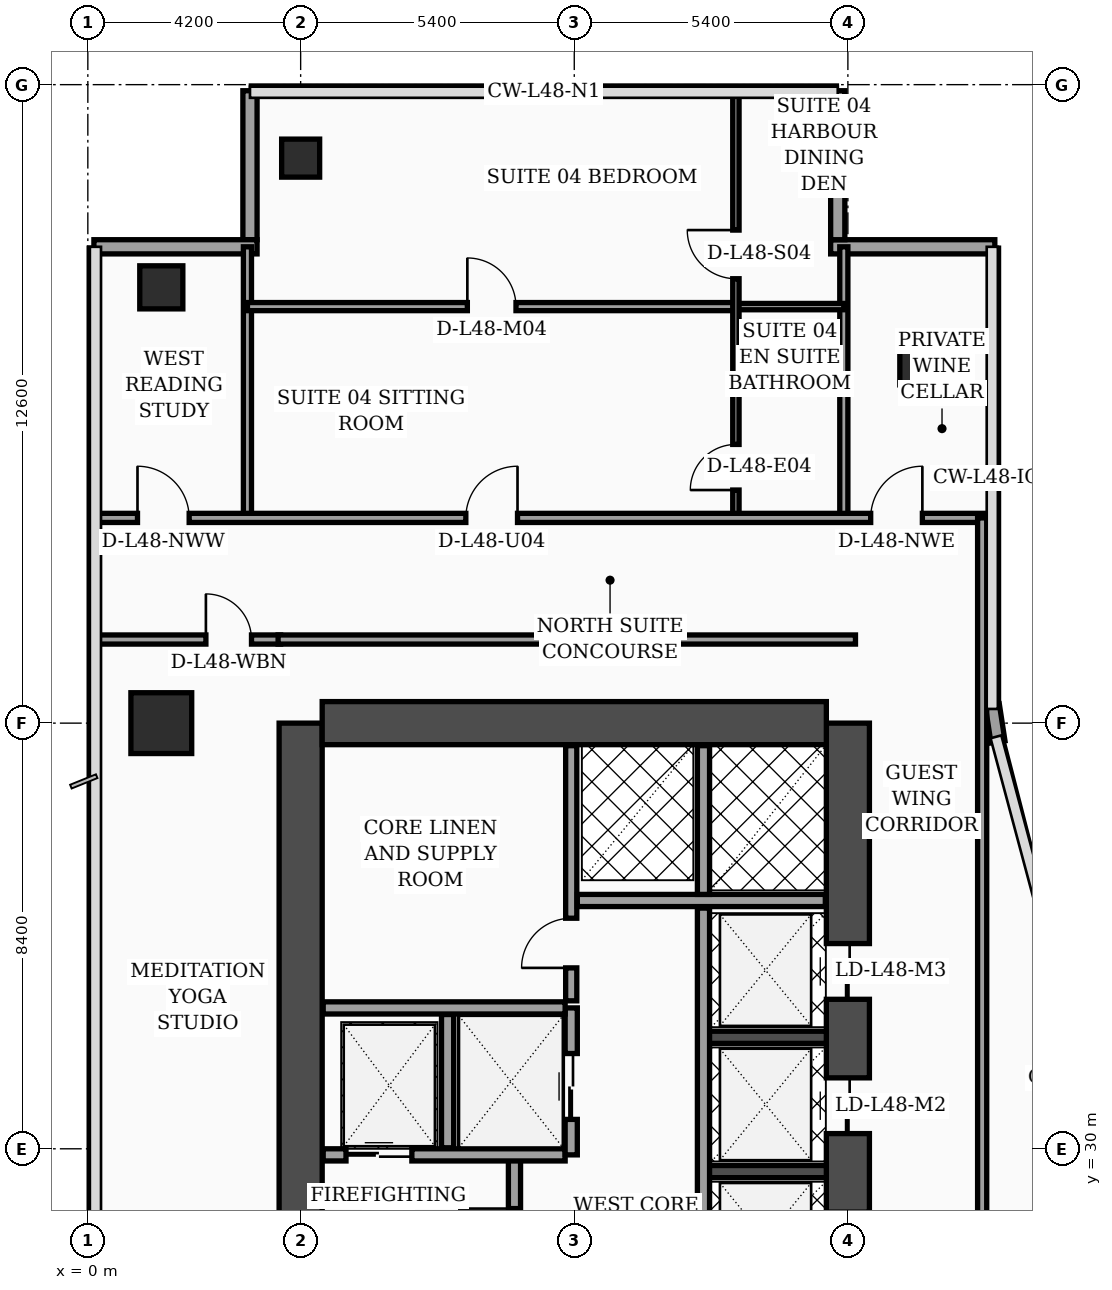
"""IFC4 building model, lengths in metres.
Left out: names, types, materials, properties, quantities, classifications, styles, units other than length and angle.
Written with IfcOpenShell. Run it as: python <this file> out.ifc"""

import sys

from ifc_helpers import new_model, si_unit, direction, frame, frame_2d, origin, origin_2d, place, context, subcontext, project, spatial, rectangle, hollow_rectangle, extrude, element, fill, save


model = new_model("IFC4")
c1 = context("Model", 3, precision=1e-05, world=origin(), true_north=direction((0.0, 1.0)))
c2 = subcontext(c1, "Body", "Model", "MODEL_VIEW")
j1 = project(units=[si_unit("LENGTHUNIT", "METRE"), si_unit("PLANEANGLEUNIT", "RADIAN")], contexts=[c1])
p1 = place(None, origin())
s1 = spatial("IfcSite", under=j1, at=p1, CompositionType="ELEMENT")
p2 = place(p1, origin())
s2 = spatial("IfcBuilding", under=s1, at=p2, CompositionType="ELEMENT")
p3 = place(p2, frame((0.0, 0.0, 195.1)))
s3 = spatial("IfcBuildingStorey", under=s2, at=p3, CompositionType="ELEMENT", Elevation=195.1)
p4 = place(p3, frame((4.2, 16.8, 0.0), z_axis=(0.0, 0.0, 1.0), x_axis=(0.0, 1.0, 0.0)))
e1 = element("IfcWall", 1, at=p4, inside=s3, PredefinedType="SHEAR", context=c2, shape_type="SweptSolid", body=[
    extrude(rectangle(XDim=21.6, YDim=0.85, at=frame_2d((10.8, 0.0))), origin(), (0.0, 0.0, 1.0), 4.05),
])
p5 = place(p3, frame((15.0, 16.8, 0.0), z_axis=(0.0, 0.0, 1.0), x_axis=(0.0, 1.0, 0.0)))
e2 = element("IfcWall", 2, at=p5, inside=s3, PredefinedType="SHEAR", context=c2, shape_type="SweptSolid", body=[
    extrude(rectangle(XDim=21.6, YDim=0.85, at=frame_2d((10.8, 0.0))), origin(), (0.0, 0.0, 1.0), 4.05),
])
p6 = place(p5, frame((8.65, 0.0, 0.0)))
e3 = element("IfcOpeningElement", 3, at=p6, cuts=e2, PredefinedType="OPENING", context=c2, shape_type="SweptSolid", body=[
    extrude(rectangle(XDim=1.1, YDim=2.2, at=frame_2d((0.55, 1.1))), frame((0.0, 0.435, 0.0), z_axis=(0.0, -1.0, 0.0), x_axis=(1.0, 0.0, 0.0)), (0.0, 0.0, 1.0), 0.87),
])
p7 = place(p5, frame((10.85, 0.0, 0.0)))
e4 = element("IfcOpeningElement", 4, at=p7, cuts=e2, PredefinedType="OPENING", context=c2, shape_type="SweptSolid", body=[
    extrude(rectangle(XDim=1.1, YDim=2.2, at=frame_2d((0.55, 1.1))), frame((0.0, 0.435, 0.0), z_axis=(0.0, -1.0, 0.0), x_axis=(1.0, 0.0, 0.0)), (0.0, 0.0, 1.0), 0.87),
])
p8 = place(p5, frame((13.5, 0.0, 0.0)))
e5 = element("IfcOpeningElement", 5, at=p8, cuts=e2, PredefinedType="OPENING", context=c2, shape_type="SweptSolid", body=[
    extrude(rectangle(XDim=1.1, YDim=2.2, at=frame_2d((0.55, 1.1))), frame((0.0, 0.435, 0.0), z_axis=(0.0, -1.0, 0.0), x_axis=(1.0, 0.0, 0.0)), (0.0, 0.0, 1.0), 0.87),
])
p9 = place(p5, frame((16.15, 0.0, 0.0)))
e6 = element("IfcOpeningElement", 6, at=p9, cuts=e2, PredefinedType="OPENING", context=c2, shape_type="SweptSolid", body=[
    extrude(rectangle(XDim=1.1, YDim=2.2, at=frame_2d((0.55, 1.1))), frame((0.0, 0.435, 0.0), z_axis=(0.0, -1.0, 0.0), x_axis=(1.0, 0.0, 0.0)), (0.0, 0.0, 1.0), 0.87),
])
p10 = place(p3, frame((4.625, 38.4, 0.0), z_axis=(0.0, 0.0, 1.0), x_axis=(1.0, 0.0, 0.0)))
e7 = element("IfcWall", 7, at=p10, inside=s3, PredefinedType="SHEAR", context=c2, shape_type="SweptSolid", body=[
    extrude(rectangle(XDim=9.95, YDim=0.85, at=frame_2d((4.975, 0.0))), origin(), (0.0, 0.0, 1.0), 4.05),
])
for number, where, z_axis, x_axis in (
    (8, (12.18, 29.55, 0.0), (0.0, 0.0, 1.0), (1.0, 0.0, 0.0)),
    (9, (12.18, 32.2, 0.0), (0.0, 0.0, 1.0), (1.0, 0.0, 0.0)),
):
    element("IfcWall", number, at=place(p3, frame(where, z_axis=z_axis, x_axis=x_axis)), inside=s3, PredefinedType="SOLIDWALL", context=c2, shape_type="SweptSolid", body=[
        extrude(rectangle(XDim=2.395, YDim=0.24, at=frame_2d((1.198, 0.0))), origin(), (0.0, 0.0, 1.0), 4.05),
    ])
p11 = place(p3, frame((1.45, 38.4, 0.0), z_axis=(0.0, 0.0, 1.0), x_axis=(1.0, 0.0, 0.0)))
e10 = element("IfcColumn", 10, at=p11, inside=s3, PredefinedType="COLUMN", context=c2, shape_type="SweptSolid", body=[
    extrude(rectangle(XDim=1.2, YDim=1.2, at=origin_2d()), origin(), (0.0, 0.0, 1.0), 4.05),
])
p12 = place(p3, frame((1.45, 47.0, 0.0), z_axis=(0.0, 0.0, 1.0), x_axis=(1.0, 0.0, 0.0)))
e11 = element("IfcColumn", 11, at=p12, inside=s3, PredefinedType="COLUMN", context=c2, shape_type="SweptSolid", body=[
    extrude(hollow_rectangle(XDim=0.85, YDim=0.85, WallThickness=0.036, at=origin_2d()), origin(), (0.0, 0.0, 1.0), 4.05),
])
p13 = place(p3, frame((4.2, 49.55, 0.0), z_axis=(0.0, 0.0, 1.0), x_axis=(1.0, 0.0, 0.0)))
e12 = element("IfcColumn", 12, at=p13, inside=s3, PredefinedType="COLUMN", context=c2, shape_type="SweptSolid", body=[
    extrude(hollow_rectangle(XDim=0.75, YDim=0.75, WallThickness=0.032, at=origin_2d()), origin(), (0.0, 0.0, 1.0), 4.05),
])
p14 = place(p3, frame((16.55, 45.6, 0.0), z_axis=(0.0, 0.0, 1.0), x_axis=(1.0, 0.0, 0.0)))
e13 = element("IfcColumn", 13, at=p14, inside=s3, PredefinedType="COLUMN", context=c2, shape_type="SweptSolid", body=[
    extrude(rectangle(XDim=1.05, YDim=1.05, at=origin_2d()), origin(), (0.0, 0.0, 1.0), 4.05),
])
p15 = place(p3, frame((17.962, 38.03, 0.0), z_axis=(0.0, 0.0, 1.0), x_axis=(-0.15141125477, 0.988470855377, 0.0)))
e14 = element("IfcWall", 14, at=p15, inside=s3, PredefinedType="SOLIDWALL", context=c2, shape_type="SweptSolid", body=[
    extrude(rectangle(XDim=0.739, YDim=0.28, at=frame_2d((0.369, 0.0))), origin(), (0.0, 0.0, 1.0), 4.05),
])
p16 = place(p3, frame((17.9, 47.8, 0.0), z_axis=(0.0, 0.0, 1.0), x_axis=(-1.0, 0.0, 0.0)))
e15 = element("IfcWall", 15, at=p16, inside=s3, PredefinedType="SOLIDWALL", context=c2, shape_type="SweptSolid", body=[
    extrude(rectangle(XDim=3.24, YDim=0.28, at=frame_2d((1.62, 0.0))), origin(), (0.0, 0.0, 1.0), 4.05),
])
p17 = place(p3, frame((14.8, 47.94, 0.0), z_axis=(0.0, 0.0, 1.0), x_axis=(0.0, 1.0, 0.0)))
e16 = element("IfcWall", 16, at=p17, inside=s3, PredefinedType="SOLIDWALL", context=c2, shape_type="SweptSolid", body=[
    extrude(rectangle(XDim=2.94, YDim=0.28, at=frame_2d((1.47, 0.0))), origin(), (0.0, 0.0, 1.0), 4.05),
])
p18 = place(p3, frame((3.2, 50.88, 0.0), z_axis=(0.0, 0.0, 1.0), x_axis=(0.0, -1.0, 0.0)))
e17 = element("IfcWall", 17, at=p18, inside=s3, PredefinedType="SOLIDWALL", context=c2, shape_type="SweptSolid", body=[
    extrude(rectangle(XDim=2.94, YDim=0.28, at=frame_2d((1.47, 0.0))), origin(), (0.0, 0.0, 1.0), 3.6),
])
p19 = place(p3, frame((3.34, 47.8, 0.0), z_axis=(0.0, 0.0, 1.0), x_axis=(-1.0, 0.0, 0.0)))
e18 = element("IfcWall", 18, at=p19, inside=s3, PredefinedType="SOLIDWALL", context=c2, shape_type="SweptSolid", body=[
    extrude(rectangle(XDim=3.22, YDim=0.28, at=frame_2d((1.61, 0.0))), origin(), (0.0, 0.0, 1.0), 3.6),
])
p20 = place(p3, frame((8.42, 26.82, 0.0), z_axis=(0.0, 0.0, 1.0), x_axis=(0.0, 1.0, 0.0)))
e19 = element("IfcWall", 19, at=p20, inside=s3, PredefinedType="SOLIDWALL", context=c2, shape_type="SweptSolid", body=[
    extrude(rectangle(XDim=3.0, YDim=0.24, at=frame_2d((1.5, 0.0))), origin(), (0.0, 0.0, 1.0), 4.05),
])
p21 = place(p20, frame((0.9, 0.0, 0.0)))
e20 = element("IfcOpeningElement", 20, at=p21, cuts=e19, PredefinedType="OPENING", context=c2, shape_type="SweptSolid", body=[
    extrude(rectangle(XDim=1.1, YDim=2.2, at=frame_2d((0.55, 1.1))), frame((0.0, 0.13, 0.0), z_axis=(0.0, -1.0, 0.0), x_axis=(1.0, 0.0, 0.0)), (0.0, 0.0, 1.0), 0.26),
])
p22 = place(p3, frame((4.645, 29.88, 0.0), z_axis=(0.0, 0.0, 1.0), x_axis=(1.0, 0.0, 0.0)))
e21 = element("IfcWall", 21, at=p22, inside=s3, PredefinedType="SOLIDWALL", context=c2, shape_type="SweptSolid", body=[
    extrude(rectangle(XDim=4.775, YDim=0.24, at=frame_2d((2.387, 0.0))), origin(), (0.0, 0.0, 1.0), 4.05),
])
p23 = place(p22, frame((0.45, 0.0, 0.0)))
e22 = element("IfcOpeningElement", 22, at=p23, cuts=e21, PredefinedType="OPENING", context=c2, shape_type="SweptSolid", body=[
    extrude(rectangle(XDim=1.3, YDim=2.35, at=frame_2d((0.65, 1.175))), frame((0.0, 0.13, 0.0), z_axis=(0.0, -1.0, 0.0), x_axis=(1.0, 0.0, 0.0)), (0.0, 0.0, 1.0), 0.26),
])
p24 = place(p3, frame((7.1, 30.02, 0.0), z_axis=(0.0, 0.0, 1.0), x_axis=(0.0, 1.0, 0.0)))
e23 = element("IfcWall", 23, at=p24, inside=s3, PredefinedType="SOLIDWALL", context=c2, shape_type="SweptSolid", body=[
    extrude(rectangle(XDim=2.63, YDim=0.24, at=frame_2d((1.315, 0.0))), origin(), (0.0, 0.0, 1.0), 4.05),
])
p25 = place(p3, frame((9.54, 29.88, 0.0), z_axis=(0.0, 0.0, 1.0), x_axis=(0.0, 1.0, 0.0)))
e24 = element("IfcWall", 24, at=p25, inside=s3, PredefinedType="SOLIDWALL", context=c2, shape_type="SweptSolid", body=[
    extrude(rectangle(XDim=2.9, YDim=0.24, at=frame_2d((1.45, 0.0))), origin(), (0.0, 0.0, 1.0), 4.05),
])
p26 = place(p25, frame((0.7, 0.0, 0.0)))
e25 = element("IfcOpeningElement", 25, at=p26, cuts=e24, PredefinedType="OPENING", context=c2, shape_type="SweptSolid", body=[
    extrude(rectangle(XDim=1.3, YDim=2.35, at=frame_2d((0.65, 1.175))), frame((0.0, 0.13, 0.0), z_axis=(0.0, -1.0, 0.0), x_axis=(1.0, 0.0, 0.0)), (0.0, 0.0, 1.0), 0.26),
])
p27 = place(p3, frame((4.645, 32.78, 0.0), z_axis=(0.0, 0.0, 1.0), x_axis=(1.0, 0.0, 0.0)))
e26 = element("IfcWall", 26, at=p27, inside=s3, PredefinedType="SOLIDWALL", context=c2, shape_type="SweptSolid", body=[
    extrude(rectangle(XDim=4.775, YDim=0.24, at=frame_2d((2.387, 0.0))), origin(), (0.0, 0.0, 1.0), 3.7),
])
p28 = place(p3, frame((9.54, 32.92, 0.0), z_axis=(0.0, 0.0, 1.0), x_axis=(0.0, 1.0, 0.0)))
e27 = element("IfcWall", 27, at=p28, inside=s3, PredefinedType="SOLIDWALL", context=c2, shape_type="SweptSolid", body=[
    extrude(rectangle(XDim=5.035, YDim=0.22, at=frame_2d((2.518, 0.0))), origin(), (0.0, 0.0, 1.0), 4.05),
])
p29 = place(p28, frame((0.65, 0.0, 0.0)))
e28 = element("IfcOpeningElement", 28, at=p29, cuts=e27, PredefinedType="OPENING", context=c2, shape_type="SweptSolid", body=[
    extrude(rectangle(XDim=0.98, YDim=2.15, at=frame_2d((0.49, 1.075))), frame((0.0, 0.12, 0.0), z_axis=(0.0, -1.0, 0.0), x_axis=(1.0, 0.0, 0.0)), (0.0, 0.0, 1.0), 0.24),
])
p30 = place(p3, frame((12.15, 27.0, 0.0), z_axis=(0.0, 0.0, 1.0), x_axis=(0.0, 1.0, 0.0)))
e29 = element("IfcWall", 29, at=p30, inside=s3, PredefinedType="SOLIDWALL", context=c2, shape_type="SweptSolid", body=[
    extrude(rectangle(XDim=7.75, YDim=0.24, at=frame_2d((3.875, 0.0))), origin(), (0.0, 0.0, 1.0), 4.05),
])
p31 = place(p3, frame((9.66, 34.9, 0.0), z_axis=(0.0, 0.0, 1.0), x_axis=(1.0, 0.0, 0.0)))
e30 = element("IfcWall", 30, at=p31, inside=s3, PredefinedType="SOLIDWALL", context=c2, shape_type="SweptSolid", body=[
    extrude(rectangle(XDim=4.895, YDim=0.24, at=frame_2d((2.448, 0.0))), origin(), (0.0, 0.0, 1.0), 4.05),
])
p32 = place(p3, frame((12.15, 35.02, 0.0), z_axis=(0.0, 0.0, 1.0), x_axis=(0.0, 1.0, 0.0)))
e31 = element("IfcWall", 31, at=p32, inside=s3, PredefinedType="SOLIDWALL", context=c2, shape_type="SweptSolid", body=[
    extrude(rectangle(XDim=2.935, YDim=0.24, at=frame_2d((1.468, 0.0))), origin(), (0.0, 0.0, 1.0), 4.05),
])
p33 = place(p3, frame((0.08, 40.05, 0.0), z_axis=(0.0, 0.0, 1.0), x_axis=(1.0, 0.0, 0.0)))
e32 = element("IfcWall", 32, at=p33, inside=s3, PredefinedType="PARTITIONING", context=c2, shape_type="SweptSolid", body=[
    extrude(rectangle(XDim=3.725, YDim=0.18, at=frame_2d((1.862, 0.0))), origin(), (0.0, 0.0, 1.0), 3.45),
])
p34 = place(p33, frame((2.25, 0.0, 0.0)))
e33 = element("IfcOpeningElement", 33, at=p34, cuts=e32, PredefinedType="OPENING", context=c2, shape_type="SweptSolid", body=[
    extrude(rectangle(XDim=0.9, YDim=2.15, at=frame_2d((0.45, 1.075))), frame((0.0, 0.1, 0.0), z_axis=(0.0, -1.0, 0.0), x_axis=(1.0, 0.0, 0.0)), (0.0, 0.0, 1.0), 0.2),
])
p35 = place(p3, frame((3.15, 42.45, 0.0), z_axis=(0.0, 0.0, 1.0), x_axis=(0.0, 1.0, 0.0)))
e34 = element("IfcWall", 34, at=p35, inside=s3, PredefinedType="PARTITIONING", context=c2, shape_type="SweptSolid", body=[
    extrude(rectangle(XDim=5.35, YDim=0.16, at=frame_2d((2.675, 0.0))), origin(), (0.0, 0.0, 1.0), 3.65),
])
p36 = place(p3, frame((14.92, 42.45, 0.0), z_axis=(0.0, 0.0, 1.0), x_axis=(0.0, 1.0, 0.0)))
e35 = element("IfcWall", 35, at=p36, inside=s3, PredefinedType="PARTITIONING", context=c2, shape_type="SweptSolid", body=[
    extrude(rectangle(XDim=5.35, YDim=0.16, at=frame_2d((2.675, 0.0))), origin(), (0.0, 0.0, 1.0), 3.6),
])
p37 = place(p3, frame((12.79, 46.62, 0.0), z_axis=(0.0, 0.0, 1.0), x_axis=(1.0, 0.0, 0.0)))
e36 = element("IfcWall", 36, at=p37, inside=s3, PredefinedType="PARTITIONING", context=c2, shape_type="SweptSolid", body=[
    extrude(rectangle(XDim=2.13, YDim=0.125, at=frame_2d((1.065, 0.0))), origin(), (0.0, 0.0, 1.0), 3.6),
])
p38 = place(p3, frame((3.15, 46.62, 0.0), z_axis=(0.0, 0.0, 1.0), x_axis=(1.0, 0.0, 0.0)))
e37 = element("IfcWall", 37, at=p38, inside=s3, PredefinedType="PARTITIONING", context=c2, shape_type="SweptSolid", body=[
    extrude(rectangle(XDim=9.64, YDim=0.16, at=frame_2d((4.82, 0.0))), origin(), (0.0, 0.0, 1.0), 3.45),
])
p39 = place(p38, frame((4.34, 0.0, 0.0)))
e38 = element("IfcOpeningElement", 38, at=p39, cuts=e37, PredefinedType="OPENING", context=c2, shape_type="SweptSolid", body=[
    extrude(rectangle(XDim=0.96, YDim=2.2, at=frame_2d((0.48, 1.1))), frame((0.0, 0.09, 0.0), z_axis=(0.0, -1.0, 0.0), x_axis=(1.0, 0.0, 0.0)), (0.0, 0.0, 1.0), 0.18),
])
p40 = place(p3, frame((12.79, 42.45, 0.0), z_axis=(0.0, 0.0, 1.0), x_axis=(0.0, 1.0, 0.0)))
e39 = element("IfcWall", 39, at=p40, inside=s3, PredefinedType="PARTITIONING", context=c2, shape_type="SweptSolid", body=[
    extrude(rectangle(XDim=8.49, YDim=0.125, at=frame_2d((4.245, 0.0))), origin(), (0.0, 0.0, 1.0), 3.6),
])
p41 = place(p40, frame((0.55, 0.0, 0.0)))
e40 = element("IfcOpeningElement", 40, at=p41, cuts=e39, PredefinedType="OPENING", context=c2, shape_type="SweptSolid", body=[
    extrude(rectangle(XDim=0.9, YDim=2.15, at=frame_2d((0.45, 1.075))), frame((0.0, 0.073, 0.0), z_axis=(0.0, -1.0, 0.0), x_axis=(1.0, 0.0, 0.0)), (0.0, 0.0, 1.0), 0.145),
])
p42 = place(p40, frame((4.72, 0.0, 0.0)))
e41 = element("IfcOpeningElement", 41, at=p42, cuts=e39, PredefinedType="OPENING", context=c2, shape_type="SweptSolid", body=[
    extrude(rectangle(XDim=0.96, YDim=2.2, at=frame_2d((0.48, 1.1))), frame((0.0, 0.073, 0.0), z_axis=(0.0, -1.0, 0.0), x_axis=(1.0, 0.0, 0.0)), (0.0, 0.0, 1.0), 0.145),
])
p43 = place(p3, frame((0.08, 42.45, 0.0), z_axis=(0.0, 0.0, 1.0), x_axis=(1.0, 0.0, 0.0)))
e42 = element("IfcWall", 42, at=p43, inside=s3, PredefinedType="PARTITIONING", context=c2, shape_type="SweptSolid", body=[
    extrude(rectangle(XDim=17.77, YDim=0.18, at=frame_2d((8.885, 0.0))), origin(), (0.0, 0.0, 1.0), 3.45),
])
p44 = place(p43, frame((0.9, 0.0, 0.0)))
e43 = element("IfcOpeningElement", 43, at=p44, cuts=e42, PredefinedType="OPENING", context=c2, shape_type="SweptSolid", body=[
    extrude(rectangle(XDim=1.02, YDim=2.2, at=frame_2d((0.51, 1.1))), frame((0.0, 0.1, 0.0), z_axis=(0.0, -1.0, 0.0), x_axis=(1.0, 0.0, 0.0)), (0.0, 0.0, 1.0), 0.2),
])
p45 = place(p43, frame((7.38, 0.0, 0.0)))
e44 = element("IfcOpeningElement", 44, at=p45, cuts=e42, PredefinedType="OPENING", context=c2, shape_type="SweptSolid", body=[
    extrude(rectangle(XDim=1.02, YDim=2.2, at=frame_2d((0.51, 1.1))), frame((0.0, 0.1, 0.0), z_axis=(0.0, -1.0, 0.0), x_axis=(1.0, 0.0, 0.0)), (0.0, 0.0, 1.0), 0.2),
])
p46 = place(p43, frame((15.37, 0.0, 0.0)))
e45 = element("IfcOpeningElement", 45, at=p46, cuts=e42, PredefinedType="OPENING", context=c2, shape_type="SweptSolid", body=[
    extrude(rectangle(XDim=1.02, YDim=2.2, at=frame_2d((0.51, 1.1))), frame((0.0, 0.1, 0.0), z_axis=(0.0, -1.0, 0.0), x_axis=(1.0, 0.0, 0.0)), (0.0, 0.0, 1.0), 0.2),
])
p47 = place(p3, frame((17.65, 24.3, 0.0), z_axis=(0.0, 0.0, 1.0), x_axis=(0.0, 1.0, 0.0)))
e46 = element("IfcWall", 46, at=p47, inside=s3, PredefinedType="PARTITIONING", context=c2, shape_type="SweptSolid", body=[
    extrude(rectangle(XDim=18.15, YDim=0.18, at=frame_2d((9.075, 0.0))), origin(), (0.0, 0.0, 1.0), 3.45),
])
p48 = place(p3, frame((3.755, 40.05, 0.0), z_axis=(0.0, 0.0, 1.0), x_axis=(1.0, 0.0, 0.0)))
e47 = element("IfcWall", 47, at=p48, inside=s3, PredefinedType="PARTITIONING", context=c2, shape_type="SweptSolid", body=[
    extrude(rectangle(XDim=11.395, YDim=0.18, at=frame_2d((5.698, 0.0))), origin(), (0.0, 0.0, 1.0), 3.45),
])
p49 = place(p21, origin())
e48 = element("IfcDoor", 48, at=p49, inside=s3, OperationType="SINGLE_SWING_RIGHT", PredefinedType="DOOR", context=c2, shape_type="SweptSolid", body=[
    extrude(rectangle(XDim=1.1, YDim=2.2, at=frame_2d((0.55, 1.1))), frame((0.0, 0.025, 0.0), z_axis=(0.0, -1.0, 0.0), x_axis=(1.0, 0.0, 0.0)), (0.0, 0.0, 1.0), 0.05),
])
fill(e20, e48)
p50 = place(p23, origin())
e49 = element("IfcDoor", 49, at=p50, inside=s3, OperationType="DOUBLE_DOOR_SLIDING", PredefinedType="DOOR", context=c2, shape_type="SweptSolid", body=[
    extrude(rectangle(XDim=1.3, YDim=2.35, at=frame_2d((0.65, 1.175))), frame((0.0, 0.025, 0.0), z_axis=(0.0, -1.0, 0.0), x_axis=(1.0, 0.0, 0.0)), (0.0, 0.0, 1.0), 0.05),
])
fill(e22, e49)
p51 = place(p26, origin())
e50 = element("IfcDoor", 50, at=p51, inside=s3, OperationType="DOUBLE_DOOR_SLIDING", PredefinedType="DOOR", context=c2, shape_type="SweptSolid", body=[
    extrude(rectangle(XDim=1.3, YDim=2.35, at=frame_2d((0.65, 1.175))), frame((0.0, 0.025, 0.0), z_axis=(0.0, -1.0, 0.0), x_axis=(1.0, 0.0, 0.0)), (0.0, 0.0, 1.0), 0.05),
])
fill(e25, e50)
p52 = place(p29, origin())
e51 = element("IfcDoor", 51, at=p52, inside=s3, OperationType="SINGLE_SWING_LEFT", PredefinedType="DOOR", context=c2, shape_type="SweptSolid", body=[
    extrude(rectangle(XDim=0.98, YDim=2.15, at=frame_2d((0.49, 1.075))), frame((0.0, 0.025, 0.0), z_axis=(0.0, -1.0, 0.0), x_axis=(1.0, 0.0, 0.0)), (0.0, 0.0, 1.0), 0.05),
])
fill(e28, e51)
p53 = place(p34, origin())
e52 = element("IfcDoor", 52, at=p53, inside=s3, OperationType="SINGLE_SWING_LEFT", PredefinedType="DOOR", context=c2, shape_type="SweptSolid", body=[
    extrude(rectangle(XDim=0.9, YDim=2.15, at=frame_2d((0.45, 1.075))), frame((0.0, 0.025, 0.0), z_axis=(0.0, -1.0, 0.0), x_axis=(1.0, 0.0, 0.0)), (0.0, 0.0, 1.0), 0.05),
])
fill(e33, e52)
p54 = place(p39, origin())
e53 = element("IfcDoor", 53, at=p54, inside=s3, OperationType="SINGLE_SWING_LEFT", PredefinedType="DOOR", context=c2, shape_type="SweptSolid", body=[
    extrude(rectangle(XDim=0.96, YDim=2.2, at=frame_2d((0.48, 1.1))), frame((0.0, 0.025, 0.0), z_axis=(0.0, -1.0, 0.0), x_axis=(1.0, 0.0, 0.0)), (0.0, 0.0, 1.0), 0.05),
])
fill(e38, e53)
p55 = place(p41, origin())
e54 = element("IfcDoor", 54, at=p55, inside=s3, OperationType="SINGLE_SWING_LEFT", PredefinedType="DOOR", context=c2, shape_type="SweptSolid", body=[
    extrude(rectangle(XDim=0.9, YDim=2.15, at=frame_2d((0.45, 1.075))), frame((0.0, 0.025, 0.0), z_axis=(0.0, -1.0, 0.0), x_axis=(1.0, 0.0, 0.0)), (0.0, 0.0, 1.0), 0.05),
])
fill(e40, e54)
p56 = place(p42, origin())
e55 = element("IfcDoor", 55, at=p56, inside=s3, OperationType="SINGLE_SWING_RIGHT", PredefinedType="DOOR", context=c2, shape_type="SweptSolid", body=[
    extrude(rectangle(XDim=0.96, YDim=2.2, at=frame_2d((0.48, 1.1))), frame((0.0, 0.025, 0.0), z_axis=(0.0, -1.0, 0.0), x_axis=(1.0, 0.0, 0.0)), (0.0, 0.0, 1.0), 0.05),
])
fill(e41, e55)
p57 = place(p44, origin())
e56 = element("IfcDoor", 56, at=p57, inside=s3, OperationType="SINGLE_SWING_LEFT", PredefinedType="DOOR", context=c2, shape_type="SweptSolid", body=[
    extrude(rectangle(XDim=1.02, YDim=2.2, at=frame_2d((0.51, 1.1))), frame((0.0, 0.025, 0.0), z_axis=(0.0, -1.0, 0.0), x_axis=(1.0, 0.0, 0.0)), (0.0, 0.0, 1.0), 0.05),
])
fill(e43, e56)
p58 = place(p45, origin())
e57 = element("IfcDoor", 57, at=p58, inside=s3, OperationType="SINGLE_SWING_RIGHT", PredefinedType="DOOR", context=c2, shape_type="SweptSolid", body=[
    extrude(rectangle(XDim=1.02, YDim=2.2, at=frame_2d((0.51, 1.1))), frame((0.0, 0.025, 0.0), z_axis=(0.0, -1.0, 0.0), x_axis=(1.0, 0.0, 0.0)), (0.0, 0.0, 1.0), 0.05),
])
fill(e44, e57)
p59 = place(p46, origin())
e58 = element("IfcDoor", 58, at=p59, inside=s3, OperationType="SINGLE_SWING_RIGHT", PredefinedType="DOOR", context=c2, shape_type="SweptSolid", body=[
    extrude(rectangle(XDim=1.02, YDim=2.2, at=frame_2d((0.51, 1.1))), frame((0.0, 0.025, 0.0), z_axis=(0.0, -1.0, 0.0), x_axis=(1.0, 0.0, 0.0)), (0.0, 0.0, 1.0), 0.05),
])
fill(e45, e58)
p60 = place(p8, origin())
e59 = element("IfcDoor", 59, at=p60, inside=s3, OperationType="DOUBLE_DOOR_SLIDING", PredefinedType="DOOR", context=c2, shape_type="SweptSolid", body=[
    extrude(rectangle(XDim=1.1, YDim=2.2, at=frame_2d((0.55, 1.1))), frame((0.0, 0.025, 0.0), z_axis=(0.0, -1.0, 0.0), x_axis=(1.0, 0.0, 0.0)), (0.0, 0.0, 1.0), 0.05),
])
fill(e5, e59)
p61 = place(p9, origin())
e60 = element("IfcDoor", 60, at=p61, inside=s3, OperationType="DOUBLE_DOOR_SLIDING", PredefinedType="DOOR", context=c2, shape_type="SweptSolid", body=[
    extrude(rectangle(XDim=1.1, YDim=2.2, at=frame_2d((0.55, 1.1))), frame((0.0, 0.025, 0.0), z_axis=(0.0, -1.0, 0.0), x_axis=(1.0, 0.0, 0.0)), (0.0, 0.0, 1.0), 0.05),
])
fill(e6, e60)
save(model, sys.argv[1])
